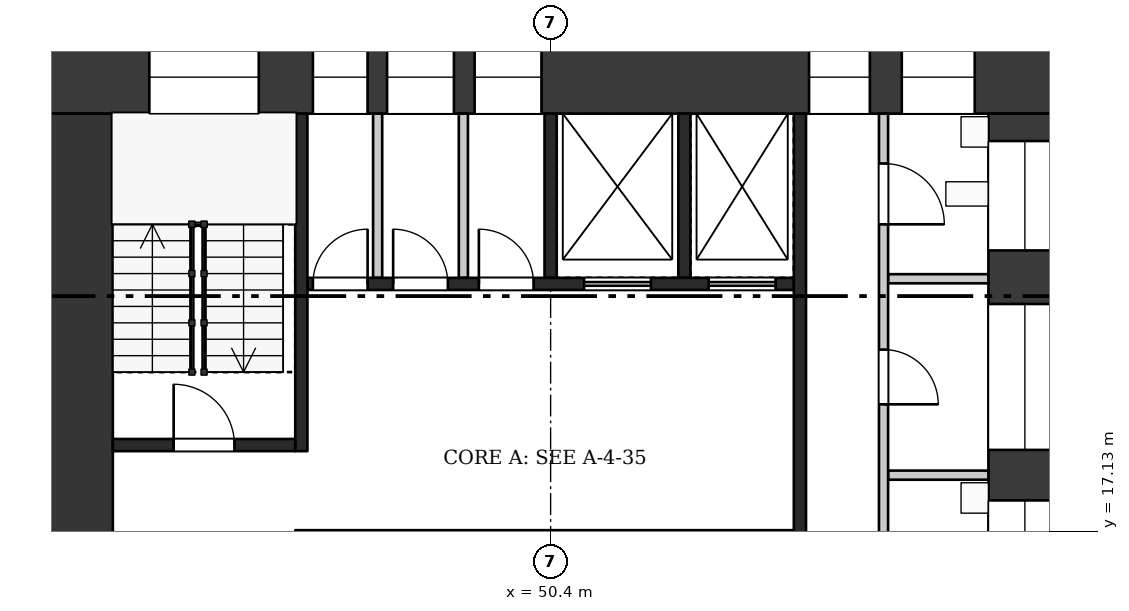
"""IFC4 building model, lengths in metres.
Left out: names, types, materials, properties, quantities, classifications, styles, units other than length and angle.
Written with IfcOpenShell. Run it as: python <this file> out.ifc"""

import sys

from ifc_helpers import new_model, si_unit, direction, frame, frame_2d, origin, place, context, subcontext, project, spatial, rectangle, extrude, element, fill, save


model = new_model("IFC4")
c1 = context("Model", 3, precision=1e-05, world=origin(), true_north=direction((0.0, 1.0)))
c2 = subcontext(c1, "Body", "Model", "MODEL_VIEW")
j1 = project(units=[si_unit("LENGTHUNIT", "METRE"), si_unit("PLANEANGLEUNIT", "RADIAN")], contexts=[c1])
p1 = place(None, origin())
s1 = spatial("IfcSite", under=j1, at=p1, CompositionType="ELEMENT")
p2 = place(p1, origin())
s2 = spatial("IfcBuilding", under=s1, at=p2, CompositionType="ELEMENT")
p3 = place(p2, frame((0.0, 0.0, 266.7)))
s3 = spatial("IfcBuildingStorey", under=s2, at=p3, CompositionType="ELEMENT", Elevation=266.7)
p4 = place(p3, frame((42.0, 24.6, 0.0), z_axis=(0.0, 0.0, 1.0), x_axis=(1.0, 0.0, 0.0)))
e1 = element("IfcWall", 1, at=p4, inside=s3, PredefinedType="SHEAR", context=c2, shape_type="SweptSolid", body=[
    extrude(rectangle(XDim=16.8, YDim=1.2, at=frame_2d((8.4, 0.0))), origin(), (0.0, 0.0, 1.0), 3.22),
])
p5 = place(p4, frame((1.8, 0.0, 0.5)))
e2 = element("IfcOpeningElement", 2, at=p5, cuts=e1, PredefinedType="OPENING", context=c2, shape_type="SweptSolid", body=[
    extrude(rectangle(XDim=1.8, YDim=2.4, at=frame_2d((0.9, 1.2))), frame((0.0, 0.61, 0.0), z_axis=(0.0, -1.0, 0.0), x_axis=(1.0, 0.0, 0.0)), (0.0, 0.0, 1.0), 1.22),
])
p6 = place(p4, frame((4.49, 0.0, 1.6)))
e3 = element("IfcOpeningElement", 3, at=p6, cuts=e1, PredefinedType="OPENING", context=c2, shape_type="SweptSolid", body=[
    extrude(rectangle(XDim=0.9, YDim=1.2, at=frame_2d((0.45, 0.6))), frame((0.0, 0.61, 0.0), z_axis=(0.0, -1.0, 0.0), x_axis=(1.0, 0.0, 0.0)), (0.0, 0.0, 1.0), 1.22),
])
p7 = place(p4, frame((5.71, 0.0, 1.6)))
e4 = element("IfcOpeningElement", 4, at=p7, cuts=e1, PredefinedType="OPENING", context=c2, shape_type="SweptSolid", body=[
    extrude(rectangle(XDim=1.1, YDim=1.2, at=frame_2d((0.55, 0.6))), frame((0.0, 0.61, 0.0), z_axis=(0.0, -1.0, 0.0), x_axis=(1.0, 0.0, 0.0)), (0.0, 0.0, 1.0), 1.22),
])
p8 = place(p4, frame((7.15, 0.0, 1.6)))
e5 = element("IfcOpeningElement", 5, at=p8, cuts=e1, PredefinedType="OPENING", context=c2, shape_type="SweptSolid", body=[
    extrude(rectangle(XDim=1.1, YDim=1.2, at=frame_2d((0.55, 0.6))), frame((0.0, 0.61, 0.0), z_axis=(0.0, -1.0, 0.0), x_axis=(1.0, 0.0, 0.0)), (0.0, 0.0, 1.0), 1.22),
])
p9 = place(p4, frame((12.65, 0.0, 0.6)))
e6 = element("IfcOpeningElement", 6, at=p9, cuts=e1, PredefinedType="OPENING", context=c2, shape_type="SweptSolid", body=[
    extrude(rectangle(XDim=1.0, YDim=2.1, at=frame_2d((0.5, 1.05))), frame((0.0, 0.61, 0.0), z_axis=(0.0, -1.0, 0.0), x_axis=(1.0, 0.0, 0.0)), (0.0, 0.0, 1.0), 1.22),
])
p10 = place(p4, frame((14.175, 0.0, 1.6)))
e7 = element("IfcOpeningElement", 7, at=p10, cuts=e1, PredefinedType="OPENING", context=c2, shape_type="SweptSolid", body=[
    extrude(rectangle(XDim=1.2, YDim=1.2, at=frame_2d((0.6, 0.6))), frame((0.0, 0.61, 0.0), z_axis=(0.0, -1.0, 0.0), x_axis=(1.0, 0.0, 0.0)), (0.0, 0.0, 1.0), 1.22),
])
p11 = place(p3, frame((42.6, 9.6, 0.0), z_axis=(0.0, 0.0, 1.0), x_axis=(0.0, 1.0, 0.0)))
e8 = element("IfcWall", 8, at=p11, inside=s3, PredefinedType="SHEAR", context=c2, shape_type="SweptSolid", body=[
    extrude(rectangle(XDim=14.4, YDim=1.2, at=frame_2d((7.2, 0.0))), origin(), (0.0, 0.0, 1.0), 3.22),
])
p12 = place(p11, frame((2.1, 0.0, 0.0)))
e9 = element("IfcOpeningElement", 9, at=p12, cuts=e8, PredefinedType="OPENING", context=c2, shape_type="SweptSolid", body=[
    extrude(rectangle(XDim=1.8, YDim=2.1, at=frame_2d((0.9, 1.05))), frame((0.0, 0.61, 0.0), z_axis=(0.0, -1.0, 0.0), x_axis=(1.0, 0.0, 0.0)), (0.0, 0.0, 1.0), 1.22),
])
p13 = place(p3, frame((58.2, 9.6, 0.0), z_axis=(0.0, 0.0, 1.0), x_axis=(0.0, 1.0, 0.0)))
e10 = element("IfcWall", 10, at=p13, inside=s3, PredefinedType="SHEAR", context=c2, shape_type="SweptSolid", body=[
    extrude(rectangle(XDim=14.4, YDim=1.2, at=frame_2d((7.2, 0.0))), origin(), (0.0, 0.0, 1.0), 3.22),
])
p14 = place(p13, frame((1.105, 0.0, 0.6)))
e11 = element("IfcOpeningElement", 11, at=p14, cuts=e10, PredefinedType="OPENING", context=c2, shape_type="SweptSolid", body=[
    extrude(rectangle(XDim=3.0, YDim=2.1, at=frame_2d((1.5, 1.05))), frame((0.0, 0.61, 0.0), z_axis=(0.0, -1.0, 0.0), x_axis=(1.0, 0.0, 0.0)), (0.0, 0.0, 1.0), 1.22),
])
p15 = place(p13, frame((5.64, 0.0, 1.6)))
e12 = element("IfcOpeningElement", 12, at=p15, cuts=e10, PredefinedType="OPENING", context=c2, shape_type="SweptSolid", body=[
    extrude(rectangle(XDim=2.4, YDim=1.2, at=frame_2d((1.2, 0.6))), frame((0.0, 0.61, 0.0), z_axis=(0.0, -1.0, 0.0), x_axis=(1.0, 0.0, 0.0)), (0.0, 0.0, 1.0), 1.22),
])
p16 = place(p13, frame((8.87, 0.0, 1.6)))
e13 = element("IfcOpeningElement", 13, at=p16, cuts=e10, PredefinedType="OPENING", context=c2, shape_type="SweptSolid", body=[
    extrude(rectangle(XDim=2.4, YDim=1.2, at=frame_2d((1.2, 0.6))), frame((0.0, 0.61, 0.0), z_axis=(0.0, -1.0, 0.0), x_axis=(1.0, 0.0, 0.0)), (0.0, 0.0, 1.0), 1.22),
])
p17 = place(p13, frame((12.15, 0.0, 1.6)))
e14 = element("IfcOpeningElement", 14, at=p17, cuts=e10, PredefinedType="OPENING", context=c2, shape_type="SweptSolid", body=[
    extrude(rectangle(XDim=1.8, YDim=1.2, at=frame_2d((0.9, 0.6))), frame((0.0, 0.61, 0.0), z_axis=(0.0, -1.0, 0.0), x_axis=(1.0, 0.0, 0.0)), (0.0, 0.0, 1.0), 1.22),
])
p18 = place(p3, frame((46.4, 17.025, 0.0), z_axis=(0.0, 0.0, 1.0), x_axis=(1.0, 0.0, 0.0)))
e15 = element("IfcWall", 15, at=p18, inside=s3, PredefinedType="SHEAR", context=c2, shape_type="SweptSolid", body=[
    extrude(rectangle(XDim=8.0, YDim=0.25, at=frame_2d((4.0, 0.0))), origin(), (0.0, 0.0, 1.0), 3.22),
])
for number, where, z_axis, x_axis in (
    (16, (50.4, 21.3, 0.0), (0.0, 0.0, 1.0), (0.0, 1.0, 0.0)),
    (17, (52.6, 21.3, 0.0), (0.0, 0.0, 1.0), (0.0, 1.0, 0.0)),
):
    element("IfcWall", number, at=place(p3, frame(where, z_axis=z_axis, x_axis=x_axis)), inside=s3, PredefinedType="SHEAR", context=c2, shape_type="SweptSolid", body=[
        extrude(rectangle(XDim=2.7, YDim=0.2, at=frame_2d((1.35, 0.0))), origin(), (0.0, 0.0, 1.0), 3.22),
    ])
for number, where, z_axis, x_axis in (
    (18, (47.555, 21.3, 0.0), (0.0, 0.0, 1.0), (0.0, 1.0, 0.0)),
    (19, (48.965, 21.3, 0.0), (0.0, 0.0, 1.0), (0.0, 1.0, 0.0)),
):
    element("IfcWall", number, at=place(p3, frame(where, z_axis=z_axis, x_axis=x_axis)), inside=s3, PredefinedType="PARTITIONING", context=c2, shape_type="SweptSolid", body=[
        extrude(rectangle(XDim=2.7, YDim=0.15, at=frame_2d((1.35, 0.0))), origin(), (0.0, 0.0, 1.0), 3.22),
    ])
p19 = place(p3, frame((46.4, 21.2, 0.0), z_axis=(0.0, 0.0, 1.0), x_axis=(1.0, 0.0, 0.0)))
e20 = element("IfcWall", 20, at=p19, inside=s3, PredefinedType="SHEAR", context=c2, shape_type="SweptSolid", body=[
    extrude(rectangle(XDim=8.0, YDim=0.2, at=frame_2d((4.0, 0.0))), origin(), (0.0, 0.0, 1.0), 3.22),
])
p20 = place(p19, frame((0.09, 0.0, 0.0)))
e21 = element("IfcOpeningElement", 21, at=p20, cuts=e20, PredefinedType="OPENING", context=c2, shape_type="SweptSolid", body=[
    extrude(rectangle(XDim=0.9, YDim=2.1, at=frame_2d((0.45, 1.05))), frame((0.0, 0.11, 0.0), z_axis=(0.0, -1.0, 0.0), x_axis=(1.0, 0.0, 0.0)), (0.0, 0.0, 1.0), 0.22),
])
p21 = place(p19, frame((1.41, 0.0, 0.0)))
e22 = element("IfcOpeningElement", 22, at=p21, cuts=e20, PredefinedType="OPENING", context=c2, shape_type="SweptSolid", body=[
    extrude(rectangle(XDim=0.9, YDim=2.1, at=frame_2d((0.45, 1.05))), frame((0.0, 0.11, 0.0), z_axis=(0.0, -1.0, 0.0), x_axis=(1.0, 0.0, 0.0)), (0.0, 0.0, 1.0), 0.22),
])
p22 = place(p19, frame((2.82, 0.0, 0.0)))
e23 = element("IfcOpeningElement", 23, at=p22, cuts=e20, PredefinedType="OPENING", context=c2, shape_type="SweptSolid", body=[
    extrude(rectangle(XDim=0.9, YDim=2.1, at=frame_2d((0.45, 1.05))), frame((0.0, 0.11, 0.0), z_axis=(0.0, -1.0, 0.0), x_axis=(1.0, 0.0, 0.0)), (0.0, 0.0, 1.0), 0.22),
])
p23 = place(p19, frame((4.55, 0.0, 0.0)))
e24 = element("IfcOpeningElement", 24, at=p23, cuts=e20, PredefinedType="OPENING", context=c2, shape_type="SweptSolid", body=[
    extrude(rectangle(XDim=1.1, YDim=2.1, at=frame_2d((0.55, 1.05))), frame((0.0, 0.11, 0.0), z_axis=(0.0, -1.0, 0.0), x_axis=(1.0, 0.0, 0.0)), (0.0, 0.0, 1.0), 0.22),
])
p24 = place(p19, frame((6.6, 0.0, 0.0)))
e25 = element("IfcOpeningElement", 25, at=p24, cuts=e20, PredefinedType="OPENING", context=c2, shape_type="SweptSolid", body=[
    extrude(rectangle(XDim=1.1, YDim=2.1, at=frame_2d((0.55, 1.05))), frame((0.0, 0.11, 0.0), z_axis=(0.0, -1.0, 0.0), x_axis=(1.0, 0.0, 0.0)), (0.0, 0.0, 1.0), 0.22),
])
p25 = place(p3, frame((46.3, 14.75, 0.0), z_axis=(0.0, 0.0, 1.0), x_axis=(0.0, 1.0, 0.0)))
e26 = element("IfcWall", 26, at=p25, inside=s3, PredefinedType="SHEAR", context=c2, shape_type="SweptSolid", body=[
    extrude(rectangle(XDim=2.4, YDim=0.2, at=frame_2d((1.2, 0.0))), origin(), (0.0, 0.0, 1.0), 3.22),
])
p26 = place(p3, frame((46.3, 18.45, 0.0), z_axis=(0.0, 0.0, 1.0), x_axis=(0.0, 1.0, 0.0)))
e27 = element("IfcWall", 27, at=p26, inside=s3, PredefinedType="SHEAR", context=c2, shape_type="SweptSolid", body=[
    extrude(rectangle(XDim=5.55, YDim=0.2, at=frame_2d((2.775, 0.0))), origin(), (0.0, 0.0, 1.0), 3.22),
])
p27 = place(p3, frame((43.2, 18.55, 0.0), z_axis=(0.0, 0.0, 1.0), x_axis=(1.0, 0.0, 0.0)))
e28 = element("IfcWall", 28, at=p27, inside=s3, PredefinedType="SHEAR", context=c2, shape_type="SweptSolid", body=[
    extrude(rectangle(XDim=3.0, YDim=0.2, at=frame_2d((1.5, 0.0))), origin(), (0.0, 0.0, 1.0), 3.22),
])
p28 = place(p27, frame((1.0, 0.0, 0.0)))
e29 = element("IfcOpeningElement", 29, at=p28, cuts=e28, PredefinedType="OPENING", context=c2, shape_type="SweptSolid", body=[
    extrude(rectangle(XDim=1.0, YDim=2.1, at=frame_2d((0.5, 1.05))), frame((0.0, 0.11, 0.0), z_axis=(0.0, -1.0, 0.0), x_axis=(1.0, 0.0, 0.0)), (0.0, 0.0, 1.0), 0.22),
])
p29 = place(p3, frame((54.5, 14.75, 0.0), z_axis=(0.0, 0.0, 1.0), x_axis=(0.0, 1.0, 0.0)))
e30 = element("IfcWall", 30, at=p29, inside=s3, PredefinedType="SHEAR", context=c2, shape_type="SweptSolid", body=[
    extrude(rectangle(XDim=9.25, YDim=0.2, at=frame_2d((4.625, 0.0))), origin(), (0.0, 0.0, 1.0), 3.22),
])
for number, where, z_axis, x_axis in (
    (31, (55.95, 18.055, 0.0), (0.0, 0.0, 1.0), (1.0, 0.0, 0.0)),
    (32, (55.95, 21.285, 0.0), (0.0, 0.0, 1.0), (1.0, 0.0, 0.0)),
):
    element("IfcWall", number, at=place(p3, frame(where, z_axis=z_axis, x_axis=x_axis)), inside=s3, PredefinedType="PARTITIONING", context=c2, shape_type="SweptSolid", body=[
        extrude(rectangle(XDim=1.65, YDim=0.15, at=frame_2d((0.825, 0.0))), origin(), (0.0, 0.0, 1.0), 3.22),
    ])
p30 = place(p3, frame((55.875, 14.9, 0.0), z_axis=(0.0, 0.0, 1.0), x_axis=(0.0, 1.0, 0.0)))
e33 = element("IfcWall", 33, at=p30, inside=s3, PredefinedType="PARTITIONING", context=c2, shape_type="SweptSolid", body=[
    extrude(rectangle(XDim=9.1, YDim=0.15, at=frame_2d((4.55, 0.0))), origin(), (0.0, 0.0, 1.0), 3.22),
])
p31 = place(p30, frame((1.04, 0.0, 0.0)))
e34 = element("IfcOpeningElement", 34, at=p31, cuts=e33, PredefinedType="OPENING", context=c2, shape_type="SweptSolid", body=[
    extrude(rectangle(XDim=1.0, YDim=2.1, at=frame_2d((0.5, 1.05))), frame((0.0, 0.085, 0.0), z_axis=(0.0, -1.0, 0.0), x_axis=(1.0, 0.0, 0.0)), (0.0, 0.0, 1.0), 0.17),
])
p32 = place(p30, frame((4.32, 0.0, 0.0)))
e35 = element("IfcOpeningElement", 35, at=p32, cuts=e33, PredefinedType="OPENING", context=c2, shape_type="SweptSolid", body=[
    extrude(rectangle(XDim=0.9, YDim=2.1, at=frame_2d((0.45, 1.05))), frame((0.0, 0.085, 0.0), z_axis=(0.0, -1.0, 0.0), x_axis=(1.0, 0.0, 0.0)), (0.0, 0.0, 1.0), 0.17),
])
p33 = place(p30, frame((7.28, 0.0, 0.0)))
e36 = element("IfcOpeningElement", 36, at=p33, cuts=e33, PredefinedType="OPENING", context=c2, shape_type="SweptSolid", body=[
    extrude(rectangle(XDim=1.0, YDim=2.1, at=frame_2d((0.5, 1.05))), frame((0.0, 0.085, 0.0), z_axis=(0.0, -1.0, 0.0), x_axis=(1.0, 0.0, 0.0)), (0.0, 0.0, 1.0), 0.17),
])
p34 = place(p20, origin())
e37 = element("IfcDoor", 37, at=p34, inside=s3, OperationType="SINGLE_SWING_RIGHT", PredefinedType="DOOR", context=c2, shape_type="SweptSolid", body=[
    extrude(rectangle(XDim=0.9, YDim=2.1, at=frame_2d((0.45, 1.05))), frame((0.0, 0.025, 0.0), z_axis=(0.0, -1.0, 0.0), x_axis=(1.0, 0.0, 0.0)), (0.0, 0.0, 1.0), 0.05),
])
fill(e21, e37)
p35 = place(p21, origin())
e38 = element("IfcDoor", 38, at=p35, inside=s3, OperationType="SINGLE_SWING_LEFT", PredefinedType="DOOR", context=c2, shape_type="SweptSolid", body=[
    extrude(rectangle(XDim=0.9, YDim=2.1, at=frame_2d((0.45, 1.05))), frame((0.0, 0.025, 0.0), z_axis=(0.0, -1.0, 0.0), x_axis=(1.0, 0.0, 0.0)), (0.0, 0.0, 1.0), 0.05),
])
fill(e22, e38)
p36 = place(p22, origin())
e39 = element("IfcDoor", 39, at=p36, inside=s3, OperationType="SINGLE_SWING_LEFT", PredefinedType="DOOR", context=c2, shape_type="SweptSolid", body=[
    extrude(rectangle(XDim=0.9, YDim=2.1, at=frame_2d((0.45, 1.05))), frame((0.0, 0.025, 0.0), z_axis=(0.0, -1.0, 0.0), x_axis=(1.0, 0.0, 0.0)), (0.0, 0.0, 1.0), 0.05),
])
fill(e23, e39)
p37 = place(p23, origin())
e40 = element("IfcDoor", 40, at=p37, inside=s3, OperationType="DOUBLE_DOOR_SLIDING", PredefinedType="DOOR", context=c2, shape_type="SweptSolid", body=[
    extrude(rectangle(XDim=1.1, YDim=2.1, at=frame_2d((0.55, 1.05))), frame((0.0, 0.025, 0.0), z_axis=(0.0, -1.0, 0.0), x_axis=(1.0, 0.0, 0.0)), (0.0, 0.0, 1.0), 0.05),
])
fill(e24, e40)
p38 = place(p24, origin())
e41 = element("IfcDoor", 41, at=p38, inside=s3, OperationType="DOUBLE_DOOR_SLIDING", PredefinedType="DOOR", context=c2, shape_type="SweptSolid", body=[
    extrude(rectangle(XDim=1.1, YDim=2.1, at=frame_2d((0.55, 1.05))), frame((0.0, 0.025, 0.0), z_axis=(0.0, -1.0, 0.0), x_axis=(1.0, 0.0, 0.0)), (0.0, 0.0, 1.0), 0.05),
])
fill(e25, e41)
p39 = place(p28, origin())
e42 = element("IfcDoor", 42, at=p39, inside=s3, OperationType="SINGLE_SWING_LEFT", PredefinedType="DOOR", context=c2, shape_type="SweptSolid", body=[
    extrude(rectangle(XDim=1.0, YDim=2.1, at=frame_2d((0.5, 1.05))), frame((0.0, 0.025, 0.0), z_axis=(0.0, -1.0, 0.0), x_axis=(1.0, 0.0, 0.0)), (0.0, 0.0, 1.0), 0.05),
])
fill(e29, e42)
p40 = place(p32, frame((0.9, 0.0, 0.0), z_axis=(0.0, 0.0, 1.0), x_axis=(-1.0, 0.0, 0.0)))
e43 = element("IfcDoor", 43, at=p40, inside=s3, OperationType="SINGLE_SWING_RIGHT", PredefinedType="DOOR", context=c2, shape_type="SweptSolid", body=[
    extrude(rectangle(XDim=0.9, YDim=2.1, at=frame_2d((0.45, 1.05))), frame((0.0, 0.025, 0.0), z_axis=(0.0, -1.0, 0.0), x_axis=(1.0, 0.0, 0.0)), (0.0, 0.0, 1.0), 0.05),
])
fill(e35, e43)
p41 = place(p33, frame((1.0, 0.0, 0.0), z_axis=(0.0, 0.0, 1.0), x_axis=(-1.0, 0.0, 0.0)))
e44 = element("IfcDoor", 44, at=p41, inside=s3, OperationType="SINGLE_SWING_RIGHT", PredefinedType="DOOR", context=c2, shape_type="SweptSolid", body=[
    extrude(rectangle(XDim=1.0, YDim=2.1, at=frame_2d((0.5, 1.05))), frame((0.0, 0.025, 0.0), z_axis=(0.0, -1.0, 0.0), x_axis=(1.0, 0.0, 0.0)), (0.0, 0.0, 1.0), 0.05),
])
fill(e36, e44)
p42 = place(p5, origin())
e45 = element("IfcWindow", 45, at=p42, inside=s3, PartitioningType="SINGLE_PANEL", PredefinedType="WINDOW", context=c2, shape_type="SweptSolid", body=[
    extrude(rectangle(XDim=1.8, YDim=2.4, at=frame_2d((0.9, 1.2))), frame((0.0, 0.03, 0.0), z_axis=(0.0, -1.0, 0.0), x_axis=(1.0, 0.0, 0.0)), (0.0, 0.0, 1.0), 0.06),
])
fill(e2, e45)
p43 = place(p6, origin())
e46 = element("IfcWindow", 46, at=p43, inside=s3, PartitioningType="SINGLE_PANEL", PredefinedType="WINDOW", context=c2, shape_type="SweptSolid", body=[
    extrude(rectangle(XDim=0.9, YDim=1.2, at=frame_2d((0.45, 0.6))), frame((0.0, 0.03, 0.0), z_axis=(0.0, -1.0, 0.0), x_axis=(1.0, 0.0, 0.0)), (0.0, 0.0, 1.0), 0.06),
])
fill(e3, e46)
p44 = place(p7, origin())
e47 = element("IfcWindow", 47, at=p44, inside=s3, PartitioningType="SINGLE_PANEL", PredefinedType="WINDOW", context=c2, shape_type="SweptSolid", body=[
    extrude(rectangle(XDim=1.1, YDim=1.2, at=frame_2d((0.55, 0.6))), frame((0.0, 0.03, 0.0), z_axis=(0.0, -1.0, 0.0), x_axis=(1.0, 0.0, 0.0)), (0.0, 0.0, 1.0), 0.06),
])
fill(e4, e47)
p45 = place(p8, origin())
e48 = element("IfcWindow", 48, at=p45, inside=s3, PartitioningType="SINGLE_PANEL", PredefinedType="WINDOW", context=c2, shape_type="SweptSolid", body=[
    extrude(rectangle(XDim=1.1, YDim=1.2, at=frame_2d((0.55, 0.6))), frame((0.0, 0.03, 0.0), z_axis=(0.0, -1.0, 0.0), x_axis=(1.0, 0.0, 0.0)), (0.0, 0.0, 1.0), 0.06),
])
fill(e5, e48)
p46 = place(p9, origin())
e49 = element("IfcWindow", 49, at=p46, inside=s3, PartitioningType="SINGLE_PANEL", PredefinedType="WINDOW", context=c2, shape_type="SweptSolid", body=[
    extrude(rectangle(XDim=1.0, YDim=2.1, at=frame_2d((0.5, 1.05))), frame((0.0, 0.03, 0.0), z_axis=(0.0, -1.0, 0.0), x_axis=(1.0, 0.0, 0.0)), (0.0, 0.0, 1.0), 0.06),
])
fill(e6, e49)
p47 = place(p10, origin())
e50 = element("IfcWindow", 50, at=p47, inside=s3, PartitioningType="SINGLE_PANEL", PredefinedType="WINDOW", context=c2, shape_type="SweptSolid", body=[
    extrude(rectangle(XDim=1.2, YDim=1.2, at=frame_2d((0.6, 0.6))), frame((0.0, 0.03, 0.0), z_axis=(0.0, -1.0, 0.0), x_axis=(1.0, 0.0, 0.0)), (0.0, 0.0, 1.0), 0.06),
])
fill(e7, e50)
p48 = place(p15, origin())
e51 = element("IfcWindow", 51, at=p48, inside=s3, PartitioningType="SINGLE_PANEL", PredefinedType="WINDOW", context=c2, shape_type="SweptSolid", body=[
    extrude(rectangle(XDim=2.4, YDim=1.2, at=frame_2d((1.2, 0.6))), frame((0.0, 0.03, 0.0), z_axis=(0.0, -1.0, 0.0), x_axis=(1.0, 0.0, 0.0)), (0.0, 0.0, 1.0), 0.06),
])
fill(e12, e51)
p49 = place(p16, origin())
e52 = element("IfcWindow", 52, at=p49, inside=s3, PartitioningType="SINGLE_PANEL", PredefinedType="WINDOW", context=c2, shape_type="SweptSolid", body=[
    extrude(rectangle(XDim=2.4, YDim=1.2, at=frame_2d((1.2, 0.6))), frame((0.0, 0.03, 0.0), z_axis=(0.0, -1.0, 0.0), x_axis=(1.0, 0.0, 0.0)), (0.0, 0.0, 1.0), 0.06),
])
fill(e13, e52)
p50 = place(p17, origin())
e53 = element("IfcWindow", 53, at=p50, inside=s3, PartitioningType="SINGLE_PANEL", PredefinedType="WINDOW", context=c2, shape_type="SweptSolid", body=[
    extrude(rectangle(XDim=1.8, YDim=1.2, at=frame_2d((0.9, 0.6))), frame((0.0, 0.03, 0.0), z_axis=(0.0, -1.0, 0.0), x_axis=(1.0, 0.0, 0.0)), (0.0, 0.0, 1.0), 0.06),
])
fill(e14, e53)
save(model, sys.argv[1])
